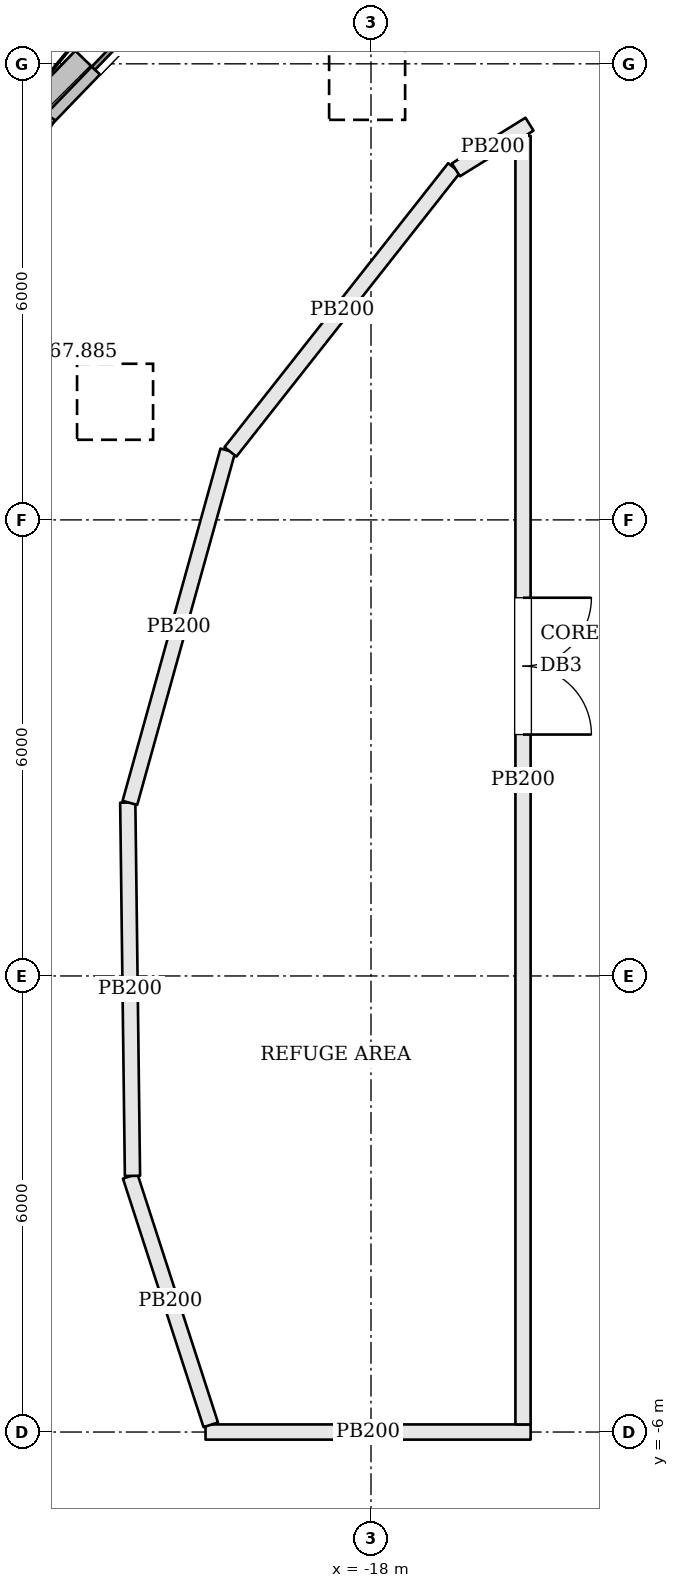
"""IFC4 building model, lengths in metres.
Left out: names, types, materials, properties, quantities, classifications, styles, units other than length and angle.
Written with IfcOpenShell. Run it as: python <this file> out.ifc"""

import sys

from ifc_helpers import new_model, si_unit, direction, frame, frame_2d, origin, origin_2d, place, context, subcontext, project, spatial, rectangle, extrude, element, fill, save


model = new_model("IFC4")
c1 = context("Model", 3, precision=1e-05, world=origin(), true_north=direction((0.0, 1.0)))
c2 = subcontext(c1, "Body", "Model", "MODEL_VIEW")
j1 = project(units=[si_unit("LENGTHUNIT", "METRE"), si_unit("PLANEANGLEUNIT", "RADIAN")], contexts=[c1])
p1 = place(None, origin())
s1 = spatial("IfcSite", under=j1, at=p1, CompositionType="ELEMENT")
p2 = place(p1, origin())
s2 = spatial("IfcBuilding", under=s1, at=p2, CompositionType="ELEMENT")
p3 = place(p2, frame((0.0, 0.0, 264.3)))
s3 = spatial("IfcBuildingStorey", under=s2, at=p3, CompositionType="ELEMENT", Elevation=264.3)
p4 = place(p3, frame((-19.593, 12.79, -0.593), z_axis=(0.336846855875, -0.224369018789, 0.914435749025), x_axis=(0.554365652735, 0.832273226211, 0.0)))
e1 = element("IfcColumn", 1, at=p4, inside=s3, PredefinedType="COLUMN", context=c2, shape_type="SweptSolid", body=[
    extrude(rectangle(XDim=1.0, YDim=1.0, at=origin_2d()), origin(), (0.0, 0.0, 1.0), 4.578),
])
p5 = place(p3, frame((-23.185, 8.21, -0.585), z_axis=(0.395577824141, -0.142730980726, 0.907273967547), x_axis=(0.339399243932, 0.940642415171, 0.0)))
e2 = element("IfcColumn", 2, at=p5, inside=s3, PredefinedType="COLUMN", context=c2, shape_type="SweptSolid", body=[
    extrude(rectangle(XDim=1.0, YDim=1.0, at=origin_2d()), origin(), (0.0, 0.0, 1.0), 4.596),
])
p6 = place(p3, frame((-19.611, 14.21, 0.0), z_axis=(0.0, 0.0, 1.0), x_axis=(-0.694225992979, -0.719757091436, 0.0)))
e3 = element("IfcWall", 3, at=p6, inside=s3, PredefinedType="SOLIDWALL", context=c2, shape_type="SweptSolid", body=[
    extrude(rectangle(XDim=3.997, YDim=0.45, at=frame_2d((1.999, 0.0))), origin(), (0.0, 0.0, 1.0), 4.3),
])
p7 = place(p6, frame((0.948, 0.0, 1.2)))
e4 = element("IfcOpeningElement", 4, at=p7, cuts=e3, PredefinedType="OPENING", context=c2, shape_type="SweptSolid", body=[
    extrude(rectangle(XDim=2.1, YDim=1.8, at=frame_2d((1.05, 0.9))), frame((0.0, 0.235, 0.0), z_axis=(0.0, -1.0, 0.0), x_axis=(1.0, 0.0, 0.0)), (0.0, 0.0, 1.0), 0.47),
])
p8 = place(p3, frame((-22.354, 11.376, 0.0), z_axis=(0.0, 0.0, 1.0), x_axis=(-0.502055516261, -0.864835393929, 0.0)))
e5 = element("IfcWall", 5, at=p8, inside=s3, PredefinedType="SOLIDWALL", context=c2, shape_type="SweptSolid", body=[
    extrude(rectangle(XDim=4.049, YDim=0.45, at=frame_2d((2.025, 0.0))), origin(), (0.0, 0.0, 1.0), 4.3),
])
p9 = place(p8, frame((0.975, 0.0, 1.2)))
e6 = element("IfcOpeningElement", 6, at=p9, cuts=e5, PredefinedType="OPENING", context=c2, shape_type="SweptSolid", body=[
    extrude(rectangle(XDim=2.1, YDim=1.8, at=frame_2d((1.05, 0.9))), frame((0.0, 0.235, 0.0), z_axis=(0.0, -1.0, 0.0), x_axis=(1.0, 0.0, 0.0)), (0.0, 0.0, 1.0), 0.47),
])
p10 = place(p3, frame((-19.708, 14.218, 4.5), z_axis=(0.0, 0.0, 1.0), x_axis=(-0.694246491391, -0.719737319576, 0.0)))
e7 = element("IfcWall", 7, at=p10, inside=s3, PredefinedType="PARAPET", context=c2, shape_type="SweptSolid", body=[
    extrude(rectangle(XDim=3.869, YDim=0.3, at=frame_2d((1.935, 0.0))), origin(), (0.0, 0.0, 1.0), 1.1),
])
p11 = place(p3, frame((-15.9, -6.0, 0.0), z_axis=(0.0, 0.0, 1.0), x_axis=(-1.0, 0.0, 0.0)))
e8 = element("IfcWall", 8, at=p11, inside=s3, PredefinedType="PARTITIONING", context=c2, shape_type="SweptSolid", body=[
    extrude(rectangle(XDim=4.277, YDim=0.2, at=frame_2d((2.139, 0.0))), origin(), (0.0, 0.0, 1.0), 4.3),
])
p12 = place(p3, frame((-20.108, -5.905, 0.0), z_axis=(0.0, 0.0, 1.0), x_axis=(-0.308376170844, 0.951264493848, 0.0)))
e9 = element("IfcWall", 9, at=p12, inside=s3, PredefinedType="PARTITIONING", context=c2, shape_type="SweptSolid", body=[
    extrude(rectangle(XDim=3.438, YDim=0.2, at=frame_2d((1.719, 0.0))), origin(), (0.0, 0.0, 1.0), 4.3),
])
p13 = place(p3, frame((-21.138, -2.63, 0.0), z_axis=(0.0, 0.0, 1.0), x_axis=(-0.012626385888, 0.999920284012, 0.0)))
e10 = element("IfcWall", 10, at=p13, inside=s3, PredefinedType="PARTITIONING", context=c2, shape_type="SweptSolid", body=[
    extrude(rectangle(XDim=4.911, YDim=0.2, at=frame_2d((2.456, 0.0))), origin(), (0.0, 0.0, 1.0), 4.3),
])
p14 = place(p3, frame((-21.172, 2.277, 0.0), z_axis=(0.0, 0.0, 1.0), x_axis=(0.267756413289, 0.963486638798, 0.0)))
e11 = element("IfcWall", 11, at=p14, inside=s3, PredefinedType="PARTITIONING", context=c2, shape_type="SweptSolid", body=[
    extrude(rectangle(XDim=4.811, YDim=0.2, at=frame_2d((2.405, 0.0))), origin(), (0.0, 0.0, 1.0), 4.3),
])
p15 = place(p3, frame((-19.849, 6.895, 0.0), z_axis=(0.0, 0.0, 1.0), x_axis=(0.618811760178, 0.785539308669, 0.0)))
e12 = element("IfcWall", 12, at=p15, inside=s3, PredefinedType="PARTITIONING", context=c2, shape_type="SweptSolid", body=[
    extrude(rectangle(XDim=4.756, YDim=0.2, at=frame_2d((2.378, 0.0))), origin(), (0.0, 0.0, 1.0), 4.3),
])
p16 = place(p3, frame((-16.883, 10.605, 0.0), z_axis=(0.0, 0.0, 1.0), x_axis=(0.84954745962, 0.527512193085, 0.0)))
e13 = element("IfcWall", 13, at=p16, inside=s3, PredefinedType="PARTITIONING", context=c2, shape_type="SweptSolid", body=[
    extrude(rectangle(XDim=1.139, YDim=0.2, at=frame_2d((0.57, 0.0))), origin(), (0.0, 0.0, 1.0), 4.3),
])
p17 = place(p3, frame((-16.0, 11.053, 0.0), z_axis=(0.0, 0.0, 1.0), x_axis=(0.0, -1.0, 0.0)))
e14 = element("IfcWall", 14, at=p17, inside=s3, PredefinedType="PARTITIONING", context=c2, shape_type="SweptSolid", body=[
    extrude(rectangle(XDim=16.953, YDim=0.2, at=frame_2d((8.477, 0.0))), origin(), (0.0, 0.0, 1.0), 4.3),
])
p18 = place(p17, frame((6.077, 0.0, 0.0)))
e15 = element("IfcOpeningElement", 15, at=p18, cuts=e14, PredefinedType="OPENING", context=c2, shape_type="SweptSolid", body=[
    extrude(rectangle(XDim=1.8, YDim=2.1, at=frame_2d((0.9, 1.05))), frame((0.0, 0.11, 0.0), z_axis=(0.0, -1.0, 0.0), x_axis=(1.0, 0.0, 0.0)), (0.0, 0.0, 1.0), 0.22),
])
p19 = place(p7, origin())
e16 = element("IfcWindow", 16, at=p19, inside=s3, PartitioningType="SINGLE_PANEL", PredefinedType="WINDOW", context=c2, shape_type="SweptSolid", body=[
    extrude(rectangle(XDim=2.1, YDim=1.8, at=frame_2d((1.05, 0.9))), frame((0.0, 0.135, 0.0), z_axis=(0.0, -1.0, 0.0), x_axis=(1.0, 0.0, 0.0)), (0.0, 0.0, 1.0), 0.06),
])
fill(e4, e16)
p20 = place(p18, origin())
e17 = element("IfcDoor", 17, at=p20, inside=s3, OperationType="DOUBLE_DOOR_SINGLE_SWING", PredefinedType="DOOR", context=c2, shape_type="SweptSolid", body=[
    extrude(rectangle(XDim=1.8, YDim=2.1, at=frame_2d((0.9, 1.05))), frame((0.0, 0.025, 0.0), z_axis=(0.0, -1.0, 0.0), x_axis=(1.0, 0.0, 0.0)), (0.0, 0.0, 1.0), 0.05),
])
fill(e15, e17)
save(model, sys.argv[1])
